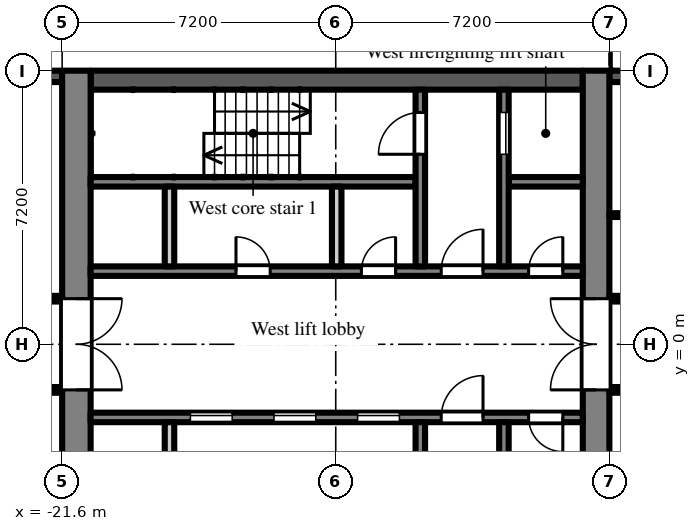
"""IFC4 building model, lengths in metres.
Left out: names, types, materials, properties, quantities, classifications, styles, units other than length and angle.
Written with IfcOpenShell. Run it as: python <this file> out.ifc"""

import sys

from ifc_helpers import new_model, si_unit, direction, frame, frame_2d, origin, place, context, subcontext, project, spatial, rectangle, extrude, element, fill, save


model = new_model("IFC4")
c1 = context("Model", 3, precision=1e-05, world=origin(), true_north=direction((0.0, 1.0)))
c2 = subcontext(c1, "Body", "Model", "MODEL_VIEW")
j1 = project(units=[si_unit("LENGTHUNIT", "METRE"), si_unit("PLANEANGLEUNIT", "RADIAN")], contexts=[c1])
p1 = place(None, origin())
s1 = spatial("IfcSite", under=j1, at=p1, CompositionType="ELEMENT")
p2 = place(p1, origin())
s2 = spatial("IfcBuilding", under=s1, at=p2, CompositionType="ELEMENT")
p3 = place(p2, frame((0.0, 0.0, 102.9)))
s3 = spatial("IfcBuildingStorey", under=s2, at=p3, CompositionType="ELEMENT", Elevation=102.9)
p4 = place(p3, frame((-4.2, 7.05, 0.0), z_axis=(0.0, 0.0, 1.0), x_axis=(-1.0, 0.0, 0.0)))
e1 = element("IfcWall", 1, at=p4, inside=s3, PredefinedType="SOLIDWALL", context=c2, shape_type="SweptSolid", body=[
    extrude(rectangle(XDim=3.0, YDim=0.3, at=frame_2d((1.5, 0.0))), origin(), (0.0, 0.0, 1.0), 2.1),
])
p5 = place(p3, frame((-21.6, 7.05, 0.0), z_axis=(0.0, 0.0, 1.0), x_axis=(-1.0, 0.0, 0.0)))
e2 = element("IfcWall", 2, at=p5, inside=s3, PredefinedType="SOLIDWALL", context=c2, shape_type="SweptSolid", body=[
    extrude(rectangle(XDim=2.7, YDim=0.3, at=frame_2d((1.35, 0.0))), origin(), (0.0, 0.0, 1.0), 2.1),
])
p6 = place(p5, frame((0.75, 0.0, 0.2)))
e3 = element("IfcOpeningElement", 3, at=p6, cuts=e2, PredefinedType="OPENING", context=c2, shape_type="SweptSolid", body=[
    extrude(rectangle(XDim=1.2, YDim=1.85, at=frame_2d((0.6, 0.925))), frame((0.0, 0.16, 0.0), z_axis=(0.0, -1.0, 0.0), x_axis=(1.0, 0.0, 0.0)), (0.0, 0.0, 1.0), 0.32),
])
p7 = place(p3, frame((-7.55, -7.2, 0.0), z_axis=(0.0, 0.0, 1.0), x_axis=(0.0, 1.0, 0.0)))
e4 = element("IfcWall", 4, at=p7, inside=s3, PredefinedType="SHEAR", context=c2, shape_type="SweptSolid", body=[
    extrude(rectangle(XDim=14.4, YDim=0.7, at=frame_2d((7.2, 0.0))), origin(), (0.0, 0.0, 1.0), 2.575),
])
p8 = place(p7, frame((6.0, 0.0, 0.0)))
e5 = element("IfcOpeningElement", 5, at=p8, cuts=e4, PredefinedType="OPENING", context=c2, shape_type="SweptSolid", body=[
    extrude(rectangle(XDim=2.4, YDim=2.2, at=frame_2d((1.2, 1.1))), frame((0.0, 0.36, 0.0), z_axis=(0.0, -1.0, 0.0), x_axis=(1.0, 0.0, 0.0)), (0.0, 0.0, 1.0), 0.72),
])
p9 = place(p3, frame((-21.225, -7.2, 0.0), z_axis=(0.0, 0.0, 1.0), x_axis=(0.0, 1.0, 0.0)))
e6 = element("IfcWall", 6, at=p9, inside=s3, PredefinedType="SHEAR", context=c2, shape_type="SweptSolid", body=[
    extrude(rectangle(XDim=14.4, YDim=0.75, at=frame_2d((7.2, 0.0))), origin(), (0.0, 0.0, 1.0), 2.575),
])
p10 = place(p9, frame((6.0, 0.0, 0.0)))
e7 = element("IfcOpeningElement", 7, at=p10, cuts=e6, PredefinedType="OPENING", context=c2, shape_type="SweptSolid", body=[
    extrude(rectangle(XDim=2.4, YDim=2.2, at=frame_2d((1.2, 1.1))), frame((0.0, 0.385, 0.0), z_axis=(0.0, -1.0, 0.0), x_axis=(1.0, 0.0, 0.0)), (0.0, 0.0, 1.0), 0.77),
])
p11 = place(p3, frame((-7.9, 6.95, 0.0), z_axis=(0.0, 0.0, 1.0), x_axis=(-1.0, 0.0, 0.0)))
e8 = element("IfcWall", 8, at=p11, inside=s3, PredefinedType="SHEAR", context=c2, shape_type="SweptSolid", body=[
    extrude(rectangle(XDim=12.95, YDim=0.5, at=frame_2d((6.475, 0.0))), origin(), (0.0, 0.0, 1.0), 2.575),
])
p12 = place(p3, frame((-7.9, 1.925, 0.0), z_axis=(0.0, 0.0, 1.0), x_axis=(-1.0, 0.0, 0.0)))
e9 = element("IfcWall", 9, at=p12, inside=s3, PredefinedType="SHEAR", context=c2, shape_type="SweptSolid", body=[
    extrude(rectangle(XDim=12.95, YDim=0.25, at=frame_2d((6.475, 0.0))), origin(), (0.0, 0.0, 1.0), 2.575),
])
p13 = place(p12, frame((0.525, 0.0, 0.0)))
e10 = element("IfcOpeningElement", 10, at=p13, cuts=e9, PredefinedType="OPENING", context=c2, shape_type="SweptSolid", body=[
    extrude(rectangle(XDim=0.9, YDim=2.1, at=frame_2d((0.45, 1.05))), frame((0.0, 0.135, 0.0), z_axis=(0.0, -1.0, 0.0), x_axis=(1.0, 0.0, 0.0)), (0.0, 0.0, 1.0), 0.27),
])
p14 = place(p12, frame((2.625, 0.0, 0.0)))
e11 = element("IfcOpeningElement", 11, at=p14, cuts=e9, PredefinedType="OPENING", context=c2, shape_type="SweptSolid", body=[
    extrude(rectangle(XDim=1.1, YDim=2.1, at=frame_2d((0.55, 1.05))), frame((0.0, 0.135, 0.0), z_axis=(0.0, -1.0, 0.0), x_axis=(1.0, 0.0, 0.0)), (0.0, 0.0, 1.0), 0.27),
])
p15 = place(p12, frame((4.925, 0.0, 0.0)))
e12 = element("IfcOpeningElement", 12, at=p15, cuts=e9, PredefinedType="OPENING", context=c2, shape_type="SweptSolid", body=[
    extrude(rectangle(XDim=0.9, YDim=2.1, at=frame_2d((0.45, 1.05))), frame((0.0, 0.135, 0.0), z_axis=(0.0, -1.0, 0.0), x_axis=(1.0, 0.0, 0.0)), (0.0, 0.0, 1.0), 0.27),
])
p16 = place(p12, frame((8.225, 0.0, 0.0)))
e13 = element("IfcOpeningElement", 13, at=p16, cuts=e9, PredefinedType="OPENING", context=c2, shape_type="SweptSolid", body=[
    extrude(rectangle(XDim=0.9, YDim=2.1, at=frame_2d((0.45, 1.05))), frame((0.0, 0.135, 0.0), z_axis=(0.0, -1.0, 0.0), x_axis=(1.0, 0.0, 0.0)), (0.0, 0.0, 1.0), 0.27),
])
p17 = place(p3, frame((-7.9, 4.275, 0.0), z_axis=(0.0, 0.0, 1.0), x_axis=(-1.0, 0.0, 0.0)))
e14 = element("IfcWall", 14, at=p17, inside=s3, PredefinedType="SHEAR", context=c2, shape_type="SweptSolid", body=[
    extrude(rectangle(XDim=1.95, YDim=0.25, at=frame_2d((0.975, 0.0))), origin(), (0.0, 0.0, 1.0), 2.575),
])
p18 = place(p3, frame((-12.3, 4.275, 0.0), z_axis=(0.0, 0.0, 1.0), x_axis=(-1.0, 0.0, 0.0)))
e15 = element("IfcWall", 15, at=p18, inside=s3, PredefinedType="SHEAR", context=c2, shape_type="SweptSolid", body=[
    extrude(rectangle(XDim=8.55, YDim=0.25, at=frame_2d((4.275, 0.0))), origin(), (0.0, 0.0, 1.0), 2.575),
])
p19 = place(p3, frame((-9.975, 2.05, 0.0), z_axis=(0.0, 0.0, 1.0), x_axis=(0.0, 1.0, 0.0)))
e16 = element("IfcWall", 16, at=p19, inside=s3, PredefinedType="SHEAR", context=c2, shape_type="SweptSolid", body=[
    extrude(rectangle(XDim=4.65, YDim=0.25, at=frame_2d((2.325, 0.0))), origin(), (0.0, 0.0, 1.0), 2.575),
])
p20 = place(p19, frame((2.95, 0.0, 0.0)))
e17 = element("IfcOpeningElement", 17, at=p20, cuts=e16, PredefinedType="OPENING", context=c2, shape_type="SweptSolid", body=[
    extrude(rectangle(XDim=1.1, YDim=2.1, at=frame_2d((0.55, 1.05))), frame((0.0, 0.135, 0.0), z_axis=(0.0, -1.0, 0.0), x_axis=(1.0, 0.0, 0.0)), (0.0, 0.0, 1.0), 0.27),
])
p21 = place(p3, frame((-12.175, 2.05, 0.0), z_axis=(0.0, 0.0, 1.0), x_axis=(0.0, 1.0, 0.0)))
e18 = element("IfcWall", 18, at=p21, inside=s3, PredefinedType="SHEAR", context=c2, shape_type="SweptSolid", body=[
    extrude(rectangle(XDim=4.65, YDim=0.25, at=frame_2d((2.325, 0.0))), origin(), (0.0, 0.0, 1.0), 2.575),
])
p22 = place(p21, frame((2.95, 0.0, 0.0)))
e19 = element("IfcOpeningElement", 19, at=p22, cuts=e18, PredefinedType="OPENING", context=c2, shape_type="SweptSolid", body=[
    extrude(rectangle(XDim=1.1, YDim=2.1, at=frame_2d((0.55, 1.05))), frame((0.0, 0.135, 0.0), z_axis=(0.0, -1.0, 0.0), x_axis=(1.0, 0.0, 0.0)), (0.0, 0.0, 1.0), 0.27),
])
for number, where, z_axis, x_axis in (
    (20, (-14.375, 2.05, 0.0), (0.0, 0.0, 1.0), (0.0, 1.0, 0.0)),
    (21, (-18.775, 2.05, 0.0), (0.0, 0.0, 1.0), (0.0, 1.0, 0.0)),
):
    element("IfcWall", number, at=place(p3, frame(where, z_axis=z_axis, x_axis=x_axis)), inside=s3, PredefinedType="PARTITIONING", context=c2, shape_type="SweptSolid", body=[
        extrude(rectangle(XDim=2.1, YDim=0.25, at=frame_2d((1.05, 0.0))), origin(), (0.0, 0.0, 1.0), 2.575),
    ])
p23 = place(p3, frame((-7.9, -1.925, 0.0), z_axis=(0.0, 0.0, 1.0), x_axis=(-1.0, 0.0, 0.0)))
e22 = element("IfcWall", 22, at=p23, inside=s3, PredefinedType="SHEAR", context=c2, shape_type="SweptSolid", body=[
    extrude(rectangle(XDim=12.95, YDim=0.25, at=frame_2d((6.475, 0.0))), origin(), (0.0, 0.0, 1.0), 2.575),
])
p24 = place(p23, frame((4.825, 0.0, 0.0)))
e23 = element("IfcOpeningElement", 23, at=p24, cuts=e22, PredefinedType="OPENING", context=c2, shape_type="SweptSolid", body=[
    extrude(rectangle(XDim=1.1, YDim=2.1, at=frame_2d((0.55, 1.05))), frame((0.0, 0.135, 0.0), z_axis=(0.0, -1.0, 0.0), x_axis=(1.0, 0.0, 0.0)), (0.0, 0.0, 1.0), 0.27),
])
p25 = place(p23, frame((7.025, 0.0, 0.0)))
e24 = element("IfcOpeningElement", 24, at=p25, cuts=e22, PredefinedType="OPENING", context=c2, shape_type="SweptSolid", body=[
    extrude(rectangle(XDim=1.1, YDim=2.1, at=frame_2d((0.55, 1.05))), frame((0.0, 0.135, 0.0), z_axis=(0.0, -1.0, 0.0), x_axis=(1.0, 0.0, 0.0)), (0.0, 0.0, 1.0), 0.27),
])
p26 = place(p23, frame((9.225, 0.0, 0.0)))
e25 = element("IfcOpeningElement", 25, at=p26, cuts=e22, PredefinedType="OPENING", context=c2, shape_type="SweptSolid", body=[
    extrude(rectangle(XDim=1.1, YDim=2.1, at=frame_2d((0.55, 1.05))), frame((0.0, 0.135, 0.0), z_axis=(0.0, -1.0, 0.0), x_axis=(1.0, 0.0, 0.0)), (0.0, 0.0, 1.0), 0.27),
])
p27 = place(p23, frame((0.525, 0.0, 0.0)))
e26 = element("IfcOpeningElement", 26, at=p27, cuts=e22, PredefinedType="OPENING", context=c2, shape_type="SweptSolid", body=[
    extrude(rectangle(XDim=0.9, YDim=2.1, at=frame_2d((0.45, 1.05))), frame((0.0, 0.135, 0.0), z_axis=(0.0, -1.0, 0.0), x_axis=(1.0, 0.0, 0.0)), (0.0, 0.0, 1.0), 0.27),
])
p28 = place(p23, frame((2.625, 0.0, 0.0)))
e27 = element("IfcOpeningElement", 27, at=p28, cuts=e22, PredefinedType="OPENING", context=c2, shape_type="SweptSolid", body=[
    extrude(rectangle(XDim=1.1, YDim=2.1, at=frame_2d((0.55, 1.05))), frame((0.0, 0.135, 0.0), z_axis=(0.0, -1.0, 0.0), x_axis=(1.0, 0.0, 0.0)), (0.0, 0.0, 1.0), 0.27),
])
p29 = place(p3, frame((-9.975, -2.05, 0.0), z_axis=(0.0, 0.0, 1.0), x_axis=(0.0, -1.0, 0.0)))
e28 = element("IfcWall", 28, at=p29, inside=s3, PredefinedType="SHEAR", context=c2, shape_type="SweptSolid", body=[
    extrude(rectangle(XDim=4.65, YDim=0.25, at=frame_2d((2.325, 0.0))), origin(), (0.0, 0.0, 1.0), 2.575),
])
p30 = place(p29, frame((2.95, 0.0, 0.0)))
e29 = element("IfcOpeningElement", 29, at=p30, cuts=e28, PredefinedType="OPENING", context=c2, shape_type="SweptSolid", body=[
    extrude(rectangle(XDim=1.1, YDim=2.1, at=frame_2d((0.55, 1.05))), frame((0.0, 0.135, 0.0), z_axis=(0.0, -1.0, 0.0), x_axis=(1.0, 0.0, 0.0)), (0.0, 0.0, 1.0), 0.27),
])
p31 = place(p3, frame((-12.175, -2.05, 0.0), z_axis=(0.0, 0.0, 1.0), x_axis=(0.0, -1.0, 0.0)))
e30 = element("IfcWall", 30, at=p31, inside=s3, PredefinedType="SHEAR", context=c2, shape_type="SweptSolid", body=[
    extrude(rectangle(XDim=4.65, YDim=0.25, at=frame_2d((2.325, 0.0))), origin(), (0.0, 0.0, 1.0), 2.575),
])
p32 = place(p31, frame((2.95, 0.0, 0.0)))
e31 = element("IfcOpeningElement", 31, at=p32, cuts=e30, PredefinedType="OPENING", context=c2, shape_type="SweptSolid", body=[
    extrude(rectangle(XDim=1.1, YDim=2.1, at=frame_2d((0.55, 1.05))), frame((0.0, 0.135, 0.0), z_axis=(0.0, -1.0, 0.0), x_axis=(1.0, 0.0, 0.0)), (0.0, 0.0, 1.0), 0.27),
])
p33 = place(p3, frame((-18.775, -2.05, 0.0), z_axis=(0.0, 0.0, 1.0), x_axis=(0.0, -1.0, 0.0)))
e32 = element("IfcWall", 32, at=p33, inside=s3, PredefinedType="PARTITIONING", context=c2, shape_type="SweptSolid", body=[
    extrude(rectangle(XDim=2.1, YDim=0.25, at=frame_2d((1.05, 0.0))), origin(), (0.0, 0.0, 1.0), 2.575),
])
p34 = place(p3, frame((-36.5, -1.2, 0.0), z_axis=(0.0, 0.0, 1.0), x_axis=(1.0, 0.0, 0.0)))
e33 = element("IfcWall", 33, at=p34, inside=s3, PredefinedType="PARTITIONING", context=c2, shape_type="SweptSolid", body=[
    extrude(rectangle(XDim=14.9, YDim=0.15, at=frame_2d((7.45, 0.0))), origin(), (0.0, 0.0, 1.0), 2.575),
])
p35 = place(p34, frame((10.4, 0.0, 0.0)))
e34 = element("IfcOpeningElement", 34, at=p35, cuts=e33, PredefinedType="OPENING", context=c2, shape_type="SweptSolid", body=[
    extrude(rectangle(XDim=1.8, YDim=2.1, at=frame_2d((0.9, 1.05))), frame((0.0, 0.085, 0.0), z_axis=(0.0, -1.0, 0.0), x_axis=(1.0, 0.0, 0.0)), (0.0, 0.0, 1.0), 0.17),
])
p36 = place(p34, frame((6.35, 0.0, 0.0)))
e35 = element("IfcOpeningElement", 35, at=p36, cuts=e33, PredefinedType="OPENING", context=c2, shape_type="SweptSolid", body=[
    extrude(rectangle(XDim=0.9, YDim=2.1, at=frame_2d((0.45, 1.05))), frame((0.0, 0.085, 0.0), z_axis=(0.0, -1.0, 0.0), x_axis=(1.0, 0.0, 0.0)), (0.0, 0.0, 1.0), 0.17),
])
p37 = place(p34, frame((4.55, 0.0, 0.0)))
e36 = element("IfcOpeningElement", 36, at=p37, cuts=e33, PredefinedType="OPENING", context=c2, shape_type="SweptSolid", body=[
    extrude(rectangle(XDim=0.9, YDim=2.1, at=frame_2d((0.45, 1.05))), frame((0.0, 0.085, 0.0), z_axis=(0.0, -1.0, 0.0), x_axis=(1.0, 0.0, 0.0)), (0.0, 0.0, 1.0), 0.17),
])
p38 = place(p34, frame((1.15, 0.0, 0.0)))
e37 = element("IfcOpeningElement", 37, at=p38, cuts=e33, PredefinedType="OPENING", context=c2, shape_type="SweptSolid", body=[
    extrude(rectangle(XDim=1.8, YDim=2.1, at=frame_2d((0.9, 1.05))), frame((0.0, 0.085, 0.0), z_axis=(0.0, -1.0, 0.0), x_axis=(1.0, 0.0, 0.0)), (0.0, 0.0, 1.0), 0.17),
])
p39 = place(p3, frame((-36.5, 1.2, 0.0), z_axis=(0.0, 0.0, 1.0), x_axis=(1.0, 0.0, 0.0)))
e38 = element("IfcWall", 38, at=p39, inside=s3, PredefinedType="PARTITIONING", context=c2, shape_type="SweptSolid", body=[
    extrude(rectangle(XDim=14.9, YDim=0.15, at=frame_2d((7.45, 0.0))), origin(), (0.0, 0.0, 1.0), 2.575),
])
p40 = place(p39, frame((10.1, 0.0, 0.0)))
e39 = element("IfcOpeningElement", 39, at=p40, cuts=e38, PredefinedType="OPENING", context=c2, shape_type="SweptSolid", body=[
    extrude(rectangle(XDim=1.0, YDim=2.1, at=frame_2d((0.5, 1.05))), frame((0.0, 0.085, 0.0), z_axis=(0.0, -1.0, 0.0), x_axis=(1.0, 0.0, 0.0)), (0.0, 0.0, 1.0), 0.17),
])
p41 = place(p39, frame((6.35, 0.0, 0.0)))
e40 = element("IfcOpeningElement", 40, at=p41, cuts=e38, PredefinedType="OPENING", context=c2, shape_type="SweptSolid", body=[
    extrude(rectangle(XDim=0.9, YDim=2.1, at=frame_2d((0.45, 1.05))), frame((0.0, 0.085, 0.0), z_axis=(0.0, -1.0, 0.0), x_axis=(1.0, 0.0, 0.0)), (0.0, 0.0, 1.0), 0.17),
])
p42 = place(p39, frame((4.55, 0.0, 0.0)))
e41 = element("IfcOpeningElement", 41, at=p42, cuts=e38, PredefinedType="OPENING", context=c2, shape_type="SweptSolid", body=[
    extrude(rectangle(XDim=0.9, YDim=2.1, at=frame_2d((0.45, 1.05))), frame((0.0, 0.085, 0.0), z_axis=(0.0, -1.0, 0.0), x_axis=(1.0, 0.0, 0.0)), (0.0, 0.0, 1.0), 0.17),
])
p43 = place(p39, frame((1.15, 0.0, 0.0)))
e42 = element("IfcOpeningElement", 42, at=p43, cuts=e38, PredefinedType="OPENING", context=c2, shape_type="SweptSolid", body=[
    extrude(rectangle(XDim=1.8, YDim=2.1, at=frame_2d((0.9, 1.05))), frame((0.0, 0.085, 0.0), z_axis=(0.0, -1.0, 0.0), x_axis=(1.0, 0.0, 0.0)), (0.0, 0.0, 1.0), 0.17),
])
p44 = place(p3, frame((-7.2, -1.2, 0.0), z_axis=(0.0, 0.0, 1.0), x_axis=(1.0, 0.0, 0.0)))
e43 = element("IfcWall", 43, at=p44, inside=s3, PredefinedType="PARTITIONING", context=c2, shape_type="SweptSolid", body=[
    extrude(rectangle(XDim=6.075, YDim=0.15, at=frame_2d((3.038, 0.0))), origin(), (0.0, 0.0, 1.0), 2.575),
])
p45 = place(p44, frame((2.55, 0.0, 0.0)))
e44 = element("IfcOpeningElement", 44, at=p45, cuts=e43, PredefinedType="OPENING", context=c2, shape_type="SweptSolid", body=[
    extrude(rectangle(XDim=0.9, YDim=2.1, at=frame_2d((0.45, 1.05))), frame((0.0, 0.085, 0.0), z_axis=(0.0, -1.0, 0.0), x_axis=(1.0, 0.0, 0.0)), (0.0, 0.0, 1.0), 0.17),
])
p46 = place(p44, frame((0.55, 0.0, 0.0)))
e45 = element("IfcOpeningElement", 45, at=p46, cuts=e43, PredefinedType="OPENING", context=c2, shape_type="SweptSolid", body=[
    extrude(rectangle(XDim=0.9, YDim=2.1, at=frame_2d((0.45, 1.05))), frame((0.0, 0.085, 0.0), z_axis=(0.0, -1.0, 0.0), x_axis=(1.0, 0.0, 0.0)), (0.0, 0.0, 1.0), 0.17),
])
p47 = place(p3, frame((-7.2, 1.2, 0.0), z_axis=(0.0, 0.0, 1.0), x_axis=(1.0, 0.0, 0.0)))
e46 = element("IfcWall", 46, at=p47, inside=s3, PredefinedType="PARTITIONING", context=c2, shape_type="SweptSolid", body=[
    extrude(rectangle(XDim=6.075, YDim=0.15, at=frame_2d((3.038, 0.0))), origin(), (0.0, 0.0, 1.0), 2.575),
])
p48 = place(p47, frame((2.55, 0.0, 0.0)))
e47 = element("IfcOpeningElement", 47, at=p48, cuts=e46, PredefinedType="OPENING", context=c2, shape_type="SweptSolid", body=[
    extrude(rectangle(XDim=0.9, YDim=2.1, at=frame_2d((0.45, 1.05))), frame((0.0, 0.085, 0.0), z_axis=(0.0, -1.0, 0.0), x_axis=(1.0, 0.0, 0.0)), (0.0, 0.0, 1.0), 0.17),
])
p49 = place(p3, frame((-7.2, 3.4, 0.0), z_axis=(0.0, 0.0, 1.0), x_axis=(1.0, 0.0, 0.0)))
e48 = element("IfcWall", 48, at=p49, inside=s3, PredefinedType="PARTITIONING", context=c2, shape_type="SweptSolid", body=[
    extrude(rectangle(XDim=5.925, YDim=0.1, at=frame_2d((2.962, 0.0))), origin(), (0.0, 0.0, 1.0), 2.575),
])
p50 = place(p24, origin())
e49 = element("IfcDoor", 49, at=p50, inside=s3, OperationType="SLIDING_TO_LEFT", PredefinedType="DOOR", context=c2, shape_type="SweptSolid", body=[
    extrude(rectangle(XDim=1.1, YDim=2.1, at=frame_2d((0.55, 1.05))), frame((0.0, 0.025, 0.0), z_axis=(0.0, -1.0, 0.0), x_axis=(1.0, 0.0, 0.0)), (0.0, 0.0, 1.0), 0.05),
])
fill(e23, e49)
p51 = place(p25, origin())
e50 = element("IfcDoor", 50, at=p51, inside=s3, OperationType="SLIDING_TO_LEFT", PredefinedType="DOOR", context=c2, shape_type="SweptSolid", body=[
    extrude(rectangle(XDim=1.1, YDim=2.1, at=frame_2d((0.55, 1.05))), frame((0.0, 0.025, 0.0), z_axis=(0.0, -1.0, 0.0), x_axis=(1.0, 0.0, 0.0)), (0.0, 0.0, 1.0), 0.05),
])
fill(e24, e50)
p52 = place(p26, origin())
e51 = element("IfcDoor", 51, at=p52, inside=s3, OperationType="SLIDING_TO_LEFT", PredefinedType="DOOR", context=c2, shape_type="SweptSolid", body=[
    extrude(rectangle(XDim=1.1, YDim=2.1, at=frame_2d((0.55, 1.05))), frame((0.0, 0.025, 0.0), z_axis=(0.0, -1.0, 0.0), x_axis=(1.0, 0.0, 0.0)), (0.0, 0.0, 1.0), 0.05),
])
fill(e25, e51)
p53 = place(p20, origin())
e52 = element("IfcDoor", 52, at=p53, inside=s3, OperationType="SLIDING_TO_LEFT", PredefinedType="DOOR", context=c2, shape_type="SweptSolid", body=[
    extrude(rectangle(XDim=1.1, YDim=2.1, at=frame_2d((0.55, 1.05))), frame((0.0, 0.025, 0.0), z_axis=(0.0, -1.0, 0.0), x_axis=(1.0, 0.0, 0.0)), (0.0, 0.0, 1.0), 0.05),
])
fill(e17, e52)
p54 = place(p22, origin())
e53 = element("IfcDoor", 53, at=p54, inside=s3, OperationType="SINGLE_SWING_LEFT", PredefinedType="DOOR", context=c2, shape_type="SweptSolid", body=[
    extrude(rectangle(XDim=1.1, YDim=2.1, at=frame_2d((0.55, 1.05))), frame((0.0, 0.025, 0.0), z_axis=(0.0, -1.0, 0.0), x_axis=(1.0, 0.0, 0.0)), (0.0, 0.0, 1.0), 0.05),
])
fill(e19, e53)
p55 = place(p13, frame((0.9, 0.0, 0.0), z_axis=(0.0, 0.0, 1.0), x_axis=(-1.0, 0.0, 0.0)))
e54 = element("IfcDoor", 54, at=p55, inside=s3, OperationType="SINGLE_SWING_RIGHT", PredefinedType="DOOR", context=c2, shape_type="SweptSolid", body=[
    extrude(rectangle(XDim=0.9, YDim=2.1, at=frame_2d((0.45, 1.05))), frame((0.0, 0.025, 0.0), z_axis=(0.0, -1.0, 0.0), x_axis=(1.0, 0.0, 0.0)), (0.0, 0.0, 1.0), 0.05),
])
fill(e10, e54)
p56 = place(p27, origin())
e55 = element("IfcDoor", 55, at=p56, inside=s3, OperationType="SINGLE_SWING_LEFT", PredefinedType="DOOR", context=c2, shape_type="SweptSolid", body=[
    extrude(rectangle(XDim=0.9, YDim=2.1, at=frame_2d((0.45, 1.05))), frame((0.0, 0.025, 0.0), z_axis=(0.0, -1.0, 0.0), x_axis=(1.0, 0.0, 0.0)), (0.0, 0.0, 1.0), 0.05),
])
fill(e26, e55)
p57 = place(p14, frame((1.1, 0.0, 0.0), z_axis=(0.0, 0.0, 1.0), x_axis=(-1.0, 0.0, 0.0)))
e56 = element("IfcDoor", 56, at=p57, inside=s3, OperationType="SINGLE_SWING_RIGHT", PredefinedType="DOOR", context=c2, shape_type="SweptSolid", body=[
    extrude(rectangle(XDim=1.1, YDim=2.1, at=frame_2d((0.55, 1.05))), frame((0.0, 0.025, 0.0), z_axis=(0.0, -1.0, 0.0), x_axis=(1.0, 0.0, 0.0)), (0.0, 0.0, 1.0), 0.05),
])
fill(e11, e56)
p58 = place(p28, frame((1.1, 0.0, 0.0), z_axis=(0.0, 0.0, 1.0), x_axis=(-1.0, 0.0, 0.0)))
e57 = element("IfcDoor", 57, at=p58, inside=s3, OperationType="SINGLE_SWING_RIGHT", PredefinedType="DOOR", context=c2, shape_type="SweptSolid", body=[
    extrude(rectangle(XDim=1.1, YDim=2.1, at=frame_2d((0.55, 1.05))), frame((0.0, 0.025, 0.0), z_axis=(0.0, -1.0, 0.0), x_axis=(1.0, 0.0, 0.0)), (0.0, 0.0, 1.0), 0.05),
])
fill(e27, e57)
p59 = place(p8, origin())
e58 = element("IfcDoor", 58, at=p59, inside=s3, OperationType="DOUBLE_DOOR_DOUBLE_SWING", PredefinedType="DOOR", context=c2, shape_type="SweptSolid", body=[
    extrude(rectangle(XDim=2.4, YDim=2.2, at=frame_2d((1.2, 1.1))), frame((0.0, 0.025, 0.0), z_axis=(0.0, -1.0, 0.0), x_axis=(1.0, 0.0, 0.0)), (0.0, 0.0, 1.0), 0.05),
])
fill(e5, e58)
p60 = place(p10, frame((2.4, 0.0, 0.0), z_axis=(0.0, 0.0, 1.0), x_axis=(-1.0, 0.0, 0.0)))
e59 = element("IfcDoor", 59, at=p60, inside=s3, OperationType="DOUBLE_DOOR_DOUBLE_SWING", PredefinedType="DOOR", context=c2, shape_type="SweptSolid", body=[
    extrude(rectangle(XDim=2.4, YDim=2.2, at=frame_2d((1.2, 1.1))), frame((0.0, 0.025, 0.0), z_axis=(0.0, -1.0, 0.0), x_axis=(1.0, 0.0, 0.0)), (0.0, 0.0, 1.0), 0.05),
])
fill(e7, e59)
p61 = place(p15, frame((0.9, 0.0, 0.0), z_axis=(0.0, 0.0, 1.0), x_axis=(-1.0, 0.0, 0.0)))
e60 = element("IfcDoor", 60, at=p61, inside=s3, OperationType="SINGLE_SWING_RIGHT", PredefinedType="DOOR", context=c2, shape_type="SweptSolid", body=[
    extrude(rectangle(XDim=0.9, YDim=2.1, at=frame_2d((0.45, 1.05))), frame((0.0, 0.025, 0.0), z_axis=(0.0, -1.0, 0.0), x_axis=(1.0, 0.0, 0.0)), (0.0, 0.0, 1.0), 0.05),
])
fill(e12, e60)
p62 = place(p16, frame((0.9, 0.0, 0.0), z_axis=(0.0, 0.0, 1.0), x_axis=(-1.0, 0.0, 0.0)))
e61 = element("IfcDoor", 61, at=p62, inside=s3, OperationType="SINGLE_SWING_LEFT", PredefinedType="DOOR", context=c2, shape_type="SweptSolid", body=[
    extrude(rectangle(XDim=0.9, YDim=2.1, at=frame_2d((0.45, 1.05))), frame((0.0, 0.025, 0.0), z_axis=(0.0, -1.0, 0.0), x_axis=(1.0, 0.0, 0.0)), (0.0, 0.0, 1.0), 0.05),
])
fill(e13, e61)
save(model, sys.argv[1])
